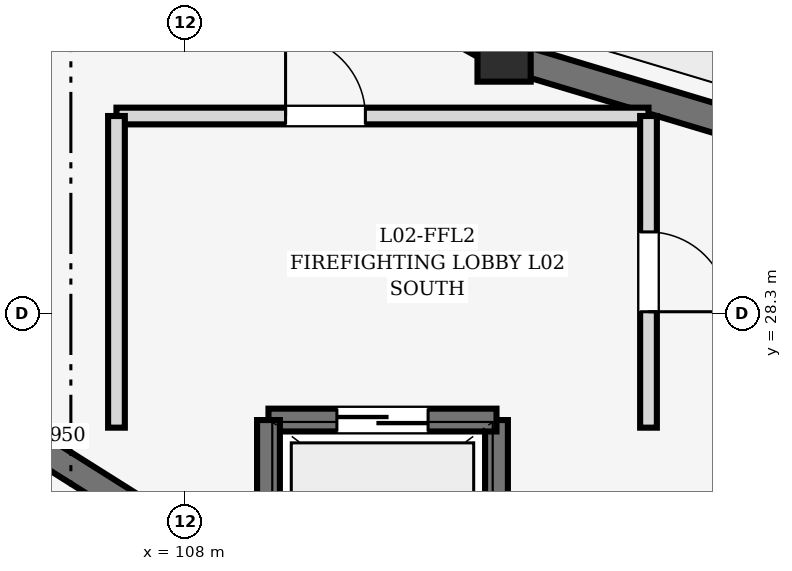
"""IFC4 building model, lengths in metres.
Left out: names, types, materials, properties, quantities, classifications, styles, units other than length and angle.
Written with IfcOpenShell. Run it as: python <this file> out.ifc"""

import sys

from ifc_helpers import new_model, si_unit, direction, frame, frame_2d, origin, origin_2d, place, context, subcontext, project, spatial, rectangle, extrude, element, fill, save


model = new_model("IFC4")
c1 = context("Model", 3, precision=1e-05, world=origin(), true_north=direction((0.0, 1.0)))
c2 = subcontext(c1, "Body", "Model", "MODEL_VIEW")
j1 = project(units=[si_unit("LENGTHUNIT", "METRE"), si_unit("PLANEANGLEUNIT", "RADIAN")], contexts=[c1])
p1 = place(None, origin())
s1 = spatial("IfcSite", under=j1, at=p1, CompositionType="ELEMENT")
p2 = place(p1, origin())
s2 = spatial("IfcBuilding", under=s1, at=p2, CompositionType="ELEMENT")
p3 = place(p2, frame((0.0, 0.0, 5.4)))
s3 = spatial("IfcBuildingStorey", under=s2, at=p3, CompositionType="ELEMENT", Elevation=5.4)
p4 = place(p3, frame((112.2, 31.702, 0.0), z_axis=(0.0, 0.0, 1.0), x_axis=(1.0, 0.0, 0.0)))
e1 = element("IfcColumn", 1, at=p4, inside=s3, PredefinedType="COLUMN", context=c2, shape_type="SweptSolid", body=[
    extrude(rectangle(XDim=0.7, YDim=0.7, at=origin_2d()), origin(), (0.0, 0.0, 1.0), 4.8),
])
p5 = place(p3, frame((108.39, 33.821, 0.0), z_axis=(0.0, 0.0, 1.0), x_axis=(0.87401308715, -0.485902380618, 0.0)))
e2 = element("IfcWall", 2, at=p5, inside=s3, PredefinedType="SOLIDWALL", context=c2, shape_type="SweptSolid", body=[
    extrude(rectangle(XDim=4.074, YDim=0.38, at=frame_2d((2.037, 0.0))), origin(), (0.0, 0.0, 1.0), 4.52),
])
p6 = place(p3, frame((103.312, 28.279, 0.0), z_axis=(0.0, 0.0, 1.0), x_axis=(0.846132783073, -0.532972150688, 0.0)))
e3 = element("IfcWall", 3, at=p6, inside=s3, PredefinedType="SHEAR", context=c2, shape_type="SweptSolid", body=[
    extrude(rectangle(XDim=5.95, YDim=0.35, at=frame_2d((2.975, 0.0))), origin(), (0.0, 0.0, 1.0), 4.52),
])
p7 = place(p3, frame((112.473, 31.621, 0.0), z_axis=(0.0, 0.0, 1.0), x_axis=(0.957792414988, -0.287460762177, 0.0)))
e4 = element("IfcWall", 4, at=p7, inside=s3, PredefinedType="SOLIDWALL", context=c2, shape_type="SweptSolid", body=[
    extrude(rectangle(XDim=4.365, YDim=0.38, at=frame_2d((2.183, 0.0))), origin(), (0.0, 0.0, 1.0), 4.52),
])
p8 = place(p3, frame((112.1, 26.9, 0.0), z_axis=(0.0, 0.0, 1.0), x_axis=(0.0, -1.0, 0.0)))
e5 = element("IfcWall", 5, at=p8, inside=s3, PredefinedType="SHEAR", context=c2, shape_type="SweptSolid", body=[
    extrude(rectangle(XDim=2.2, YDim=0.3, at=frame_2d((1.1, 0.0))), origin(), (0.0, 0.0, 1.0), 4.55),
])
p9 = place(p3, frame((109.1, 26.9, 0.0), z_axis=(0.0, 0.0, 1.0), x_axis=(1.0, 0.0, 0.0)))
e6 = element("IfcWall", 6, at=p9, inside=s3, PredefinedType="SHEAR", context=c2, shape_type="SweptSolid", body=[
    extrude(rectangle(XDim=3.0, YDim=0.3, at=frame_2d((1.5, 0.0))), origin(), (0.0, 0.0, 1.0), 4.55),
])
p10 = place(p9, frame((0.9, 0.0, 0.0)))
e7 = element("IfcOpeningElement", 7, at=p10, cuts=e6, PredefinedType="OPENING", context=c2, shape_type="SweptSolid", body=[
    extrude(rectangle(XDim=1.2, YDim=2.15, at=frame_2d((0.6, 1.075))), frame((0.0, 0.162, 0.0), z_axis=(0.0, -1.0, 0.0), x_axis=(1.0, 0.0, 0.0)), (0.0, 0.0, 1.0), 0.324),
])
p11 = place(p3, frame((109.1, 24.7, 0.0), z_axis=(0.0, 0.0, 1.0), x_axis=(0.0, 1.0, 0.0)))
e8 = element("IfcWall", 8, at=p11, inside=s3, PredefinedType="SHEAR", context=c2, shape_type="SweptSolid", body=[
    extrude(rectangle(XDim=2.2, YDim=0.3, at=frame_2d((1.1, 0.0))), origin(), (0.0, 0.0, 1.0), 4.52),
])
p12 = place(p3, frame((107.1, 30.9, 0.0), z_axis=(0.0, 0.0, 1.0), x_axis=(1.0, 0.0, 0.0)))
e9 = element("IfcWall", 9, at=p12, inside=s3, PredefinedType="SOLIDWALL", context=c2, shape_type="SweptSolid", body=[
    extrude(rectangle(XDim=7.0, YDim=0.22, at=frame_2d((3.5, 0.0))), origin(), (0.0, 0.0, 1.0), 4.535),
])
p13 = place(p12, frame((2.225, 0.0, 0.0)))
e10 = element("IfcOpeningElement", 10, at=p13, cuts=e9, PredefinedType="OPENING", context=c2, shape_type="SweptSolid", body=[
    extrude(rectangle(XDim=1.05, YDim=2.15, at=frame_2d((0.525, 1.075))), frame((0.0, 0.122, 0.0), z_axis=(0.0, -1.0, 0.0), x_axis=(1.0, 0.0, 0.0)), (0.0, 0.0, 1.0), 0.244),
])
p14 = place(p3, frame((107.1, 26.8, 0.0), z_axis=(0.0, 0.0, 1.0), x_axis=(0.0, 1.0, 0.0)))
e11 = element("IfcWall", 11, at=p14, inside=s3, PredefinedType="SOLIDWALL", context=c2, shape_type="SweptSolid", body=[
    extrude(rectangle(XDim=4.1, YDim=0.22, at=frame_2d((2.05, 0.0))), origin(), (0.0, 0.0, 1.0), 4.535),
])
p15 = place(p3, frame((114.1, 30.9, 0.0), z_axis=(0.0, 0.0, 1.0), x_axis=(0.0, -1.0, 0.0)))
e12 = element("IfcWall", 12, at=p15, inside=s3, PredefinedType="SOLIDWALL", context=c2, shape_type="SweptSolid", body=[
    extrude(rectangle(XDim=4.1, YDim=0.22, at=frame_2d((2.05, 0.0))), origin(), (0.0, 0.0, 1.0), 4.535),
])
p16 = place(p15, frame((1.525, 0.0, 0.0)))
e13 = element("IfcOpeningElement", 13, at=p16, cuts=e12, PredefinedType="OPENING", context=c2, shape_type="SweptSolid", body=[
    extrude(rectangle(XDim=1.05, YDim=2.15, at=frame_2d((0.525, 1.075))), frame((0.0, 0.122, 0.0), z_axis=(0.0, -1.0, 0.0), x_axis=(1.0, 0.0, 0.0)), (0.0, 0.0, 1.0), 0.244),
])
p17 = place(p10, origin())
e14 = element("IfcDoor", 14, at=p17, inside=s3, OperationType="DOUBLE_DOOR_SLIDING", PredefinedType="DOOR", context=c2, shape_type="SweptSolid", body=[
    extrude(rectangle(XDim=1.2, YDim=2.15, at=frame_2d((0.6, 1.075))), frame((0.0, 0.025, 0.0), z_axis=(0.0, -1.0, 0.0), x_axis=(1.0, 0.0, 0.0)), (0.0, 0.0, 1.0), 0.05),
])
fill(e7, e14)
p18 = place(p13, origin())
e15 = element("IfcDoor", 15, at=p18, inside=s3, OperationType="SINGLE_SWING_LEFT", PredefinedType="DOOR", context=c2, shape_type="SweptSolid", body=[
    extrude(rectangle(XDim=1.05, YDim=2.15, at=frame_2d((0.525, 1.075))), frame((0.0, 0.025, 0.0), z_axis=(0.0, -1.0, 0.0), x_axis=(1.0, 0.0, 0.0)), (0.0, 0.0, 1.0), 0.05),
])
fill(e10, e15)
p19 = place(p16, origin())
e16 = element("IfcDoor", 16, at=p19, inside=s3, OperationType="SINGLE_SWING_RIGHT", PredefinedType="DOOR", context=c2, shape_type="SweptSolid", body=[
    extrude(rectangle(XDim=1.05, YDim=2.15, at=frame_2d((0.525, 1.075))), frame((0.0, 0.025, 0.0), z_axis=(0.0, -1.0, 0.0), x_axis=(1.0, 0.0, 0.0)), (0.0, 0.0, 1.0), 0.05),
])
fill(e13, e16)
save(model, sys.argv[1])
